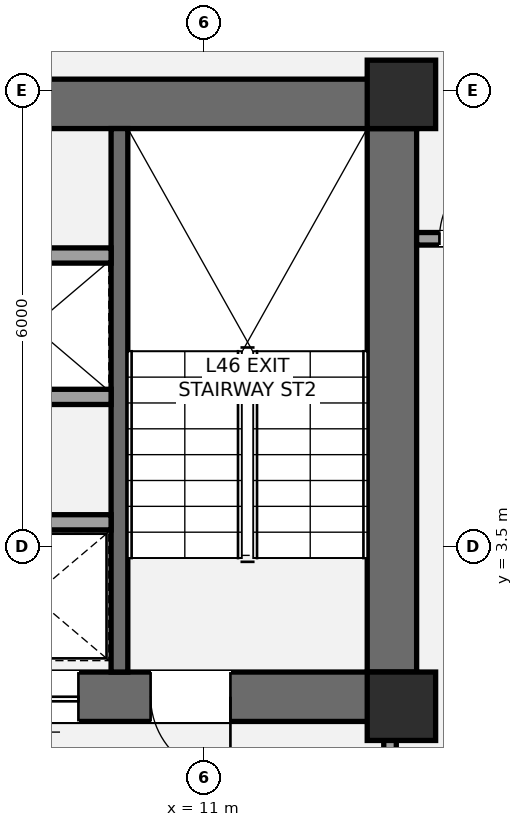
"""IFC4 building model, lengths in metres.
Left out: names, types, materials, properties, quantities, classifications, styles, units other than length and angle.
Written with IfcOpenShell. Run it as: python <this file> out.ifc"""

import sys

from ifc_helpers import new_model, si_unit, direction, frame, frame_2d, origin, origin_2d, place, context, subcontext, project, spatial, rectangle, extrude, element, fill, save


model = new_model("IFC4")
c1 = context("Model", 3, precision=1e-05, world=origin(), true_north=direction((0.0, 1.0)))
c2 = subcontext(c1, "Body", "Model", "MODEL_VIEW")
j1 = project(units=[si_unit("LENGTHUNIT", "METRE"), si_unit("PLANEANGLEUNIT", "RADIAN")], contexts=[c1])
p1 = place(None, origin())
s1 = spatial("IfcSite", under=j1, at=p1, CompositionType="ELEMENT")
p2 = place(p1, origin())
s2 = spatial("IfcBuilding", under=s1, at=p2, CompositionType="ELEMENT")
p3 = place(p2, frame((0.0, 0.0, 169.4)))
s3 = spatial("IfcBuildingStorey", under=s2, at=p3, CompositionType="ELEMENT", Elevation=169.4)
p4 = place(p3, frame((13.475, 1.2, 0.0), z_axis=(0.0, 0.0, 1.0), x_axis=(0.0, 1.0, 0.0)))
e1 = element("IfcWall", 1, at=p4, inside=s3, PredefinedType="SHEAR", context=c2, shape_type="SweptSolid", body=[
    extrude(rectangle(XDim=8.45, YDim=0.65, at=frame_2d((4.225, 0.0))), origin(), (0.0, 0.0, 1.0), 3.2),
])
p5 = place(p3, frame((4.475, 9.325, 0.0), z_axis=(0.0, 0.0, 1.0), x_axis=(1.0, 0.0, 0.0)))
e2 = element("IfcWall", 2, at=p5, inside=s3, PredefinedType="SHEAR", context=c2, shape_type="SweptSolid", body=[
    extrude(rectangle(XDim=9.325, YDim=0.65, at=frame_2d((4.663, 0.0))), origin(), (0.0, 0.0, 1.0), 3.2),
])
p6 = place(p3, frame((13.8, 1.525, 0.0), z_axis=(0.0, 0.0, 1.0), x_axis=(-1.0, 0.0, 0.0)))
e3 = element("IfcWall", 3, at=p6, inside=s3, PredefinedType="SHEAR", context=c2, shape_type="SweptSolid", body=[
    extrude(rectangle(XDim=8.925, YDim=0.65, at=frame_2d((4.462, 0.0))), origin(), (0.0, 0.0, 1.0), 3.2),
])
p7 = place(p6, frame((2.45, 0.0, 0.0)))
e4 = element("IfcOpeningElement", 4, at=p7, cuts=e3, PredefinedType="OPENING", context=c2, shape_type="SweptSolid", body=[
    extrude(rectangle(XDim=1.05, YDim=2.15, at=frame_2d((0.525, 1.075))), frame((0.0, 0.335, 0.0), z_axis=(0.0, -1.0, 0.0), x_axis=(1.0, 0.0, 0.0)), (0.0, 0.0, 1.0), 0.67),
])
p8 = place(p6, frame((4.45, 0.0, 0.0)))
e5 = element("IfcOpeningElement", 5, at=p8, cuts=e3, PredefinedType="OPENING", context=c2, shape_type="SweptSolid", body=[
    extrude(rectangle(XDim=1.1, YDim=2.2, at=frame_2d((0.55, 1.1))), frame((0.0, 0.335, 0.0), z_axis=(0.0, -1.0, 0.0), x_axis=(1.0, 0.0, 0.0)), (0.0, 0.0, 1.0), 0.67),
])
p9 = place(p3, frame((9.89, 1.85, 0.0), z_axis=(0.0, 0.0, 1.0), x_axis=(0.0, 1.0, 0.0)))
e6 = element("IfcWall", 6, at=p9, inside=s3, PredefinedType="SHEAR", context=c2, shape_type="SweptSolid", body=[
    extrude(rectangle(XDim=7.15, YDim=0.22, at=frame_2d((3.575, 0.0))), origin(), (0.0, 0.0, 1.0), 3.2),
])
for number, where, z_axis, x_axis in (
    (7, (13.6, 1.4, 0.0), (0.0, 0.0, 1.0), (1.0, 0.0, 0.0)),
    (8, (13.6, 9.45, 0.0), (0.0, 0.0, 1.0), (1.0, 0.0, 0.0)),
):
    element("IfcColumn", number, at=place(p3, frame(where, z_axis=z_axis, x_axis=x_axis)), inside=s3, PredefinedType="COLUMN", context=c2, shape_type="SweptSolid", body=[
        extrude(rectangle(XDim=0.9, YDim=0.9, at=origin_2d()), origin(), (0.0, 0.0, 1.0), 3.2),
    ])
p10 = place(p3, frame((13.45, -2.15, 0.0), z_axis=(0.0, 0.0, 1.0), x_axis=(0.0, 1.0, 0.0)))
e9 = element("IfcWall", 9, at=p10, inside=s3, PredefinedType="PARTITIONING", context=c2, shape_type="SweptSolid", body=[
    extrude(rectangle(XDim=3.4, YDim=0.165, at=frame_2d((1.7, 0.0))), origin(), (0.0, 0.0, 1.0), 2.473),
])
p11 = place(p10, frame((1.15, 0.0, 0.0)))
e10 = element("IfcOpeningElement", 10, at=p11, cuts=e9, PredefinedType="OPENING", context=c2, shape_type="SweptSolid", body=[
    extrude(rectangle(XDim=1.05, YDim=2.15, at=frame_2d((0.525, 1.075))), frame((0.0, 0.093, 0.0), z_axis=(0.0, -1.0, 0.0), x_axis=(1.0, 0.0, 0.0)), (0.0, 0.0, 1.0), 0.185),
])
p12 = place(p3, frame((5.525, 3.82, 0.0), z_axis=(0.0, 0.0, 1.0), x_axis=(1.0, 0.0, 0.0)))
e11 = element("IfcWall", 11, at=p12, inside=s3, PredefinedType="SOLIDWALL", context=c2, shape_type="SweptSolid", body=[
    extrude(rectangle(XDim=4.255, YDim=0.2, at=frame_2d((2.127, 0.0))), origin(), (0.0, 0.0, 1.0), 3.02),
])
p13 = place(p12, frame((0.65, 0.0, 0.0)))
e12 = element("IfcOpeningElement", 12, at=p13, cuts=e11, PredefinedType="OPENING", context=c2, shape_type="SweptSolid", body=[
    extrude(rectangle(XDim=1.2, YDim=2.2, at=frame_2d((0.6, 1.1))), frame((0.0, 0.11, 0.0), z_axis=(0.0, -1.0, 0.0), x_axis=(1.0, 0.0, 0.0)), (0.0, 0.0, 1.0), 0.22),
])
for number, where, z_axis, x_axis in (
    (13, (5.525, 5.47, 0.0), (0.0, 0.0, 1.0), (1.0, 0.0, 0.0)),
    (14, (5.525, 7.33, 0.0), (0.0, 0.0, 1.0), (1.0, 0.0, 0.0)),
):
    element("IfcWall", number, at=place(p3, frame(where, z_axis=z_axis, x_axis=x_axis)), inside=s3, PredefinedType="SOLIDWALL", context=c2, shape_type="SweptSolid", body=[
        extrude(rectangle(XDim=4.255, YDim=0.2, at=frame_2d((2.127, 0.0))), origin(), (0.0, 0.0, 1.0), 3.02),
    ])
p14 = place(p3, frame((13.8, 7.55, 0.0), z_axis=(0.0, 0.0, 1.0), x_axis=(1.0, 0.0, 0.0)))
e15 = element("IfcWall", 15, at=p14, inside=s3, PredefinedType="PARTITIONING", context=c2, shape_type="SweptSolid", body=[
    extrude(rectangle(XDim=2.3, YDim=0.165, at=frame_2d((1.15, 0.0))), origin(), (0.0, 0.0, 1.0), 2.473),
])
p15 = place(p14, frame((0.3, 0.0, 0.0)))
e16 = element("IfcOpeningElement", 16, at=p15, cuts=e15, PredefinedType="OPENING", context=c2, shape_type="SweptSolid", body=[
    extrude(rectangle(XDim=1.0, YDim=2.15, at=frame_2d((0.5, 1.075))), frame((0.0, 0.093, 0.0), z_axis=(0.0, -1.0, 0.0), x_axis=(1.0, 0.0, 0.0)), (0.0, 0.0, 1.0), 0.185),
])
p16 = place(p7, origin())
e17 = element("IfcDoor", 17, at=p16, inside=s3, OperationType="SINGLE_SWING_LEFT", PredefinedType="DOOR", context=c2, shape_type="SweptSolid", body=[
    extrude(rectangle(XDim=1.05, YDim=2.15, at=frame_2d((0.525, 1.075))), frame((0.0, 0.025, 0.0), z_axis=(0.0, -1.0, 0.0), x_axis=(1.0, 0.0, 0.0)), (0.0, 0.0, 1.0), 0.05),
])
fill(e4, e17)
p17 = place(p8, origin())
e18 = element("IfcDoor", 18, at=p17, inside=s3, OperationType="SLIDING_TO_LEFT", PredefinedType="DOOR", context=c2, shape_type="SweptSolid", body=[
    extrude(rectangle(XDim=1.1, YDim=2.2, at=frame_2d((0.55, 1.1))), frame((0.0, 0.025, 0.0), z_axis=(0.0, -1.0, 0.0), x_axis=(1.0, 0.0, 0.0)), (0.0, 0.0, 1.0), 0.05),
])
fill(e5, e18)
p18 = place(p15, origin())
e19 = element("IfcDoor", 19, at=p18, inside=s3, OperationType="SINGLE_SWING_RIGHT", PredefinedType="DOOR", context=c2, shape_type="SweptSolid", body=[
    extrude(rectangle(XDim=1.0, YDim=2.15, at=frame_2d((0.5, 1.075))), frame((0.0, 0.025, 0.0), z_axis=(0.0, -1.0, 0.0), x_axis=(1.0, 0.0, 0.0)), (0.0, 0.0, 1.0), 0.05),
])
fill(e16, e19)
save(model, sys.argv[1])
